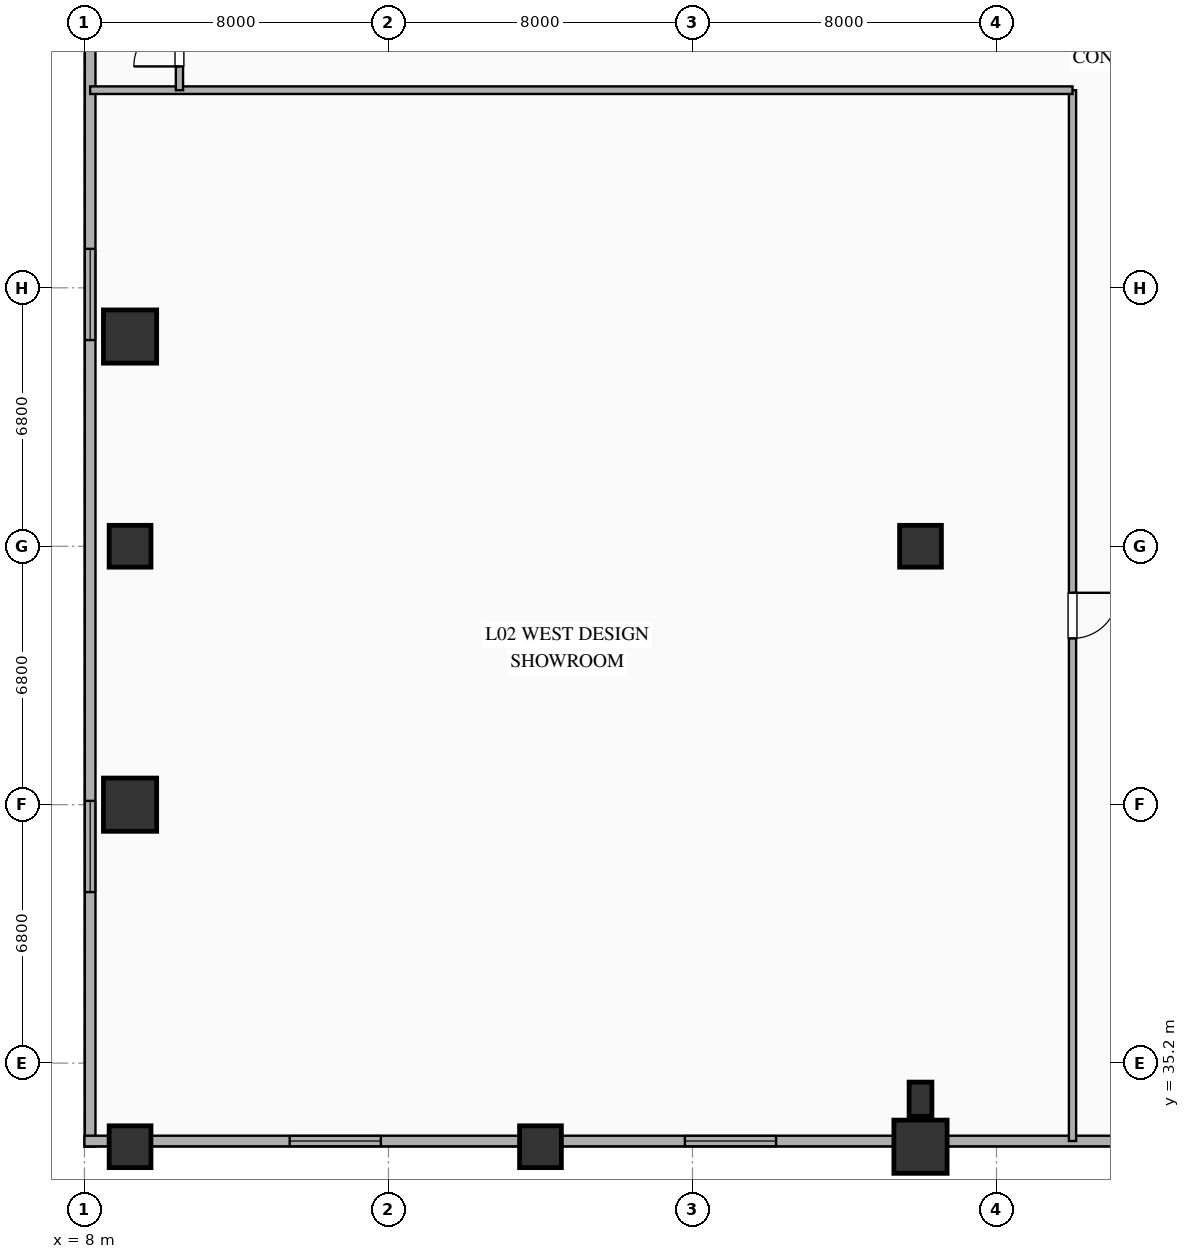
"""IFC4 building model, lengths in metres.
Left out: names, types, materials, properties, quantities, classifications, styles, units other than length and angle.
Written with IfcOpenShell. Run it as: python <this file> out.ifc"""

import sys

from ifc_helpers import new_model, si_unit, direction, frame, frame_2d, origin, origin_2d, place, context, subcontext, project, spatial, rectangle, extrude, element, fill, save


model = new_model("IFC4")
c1 = context("Model", 3, precision=1e-05, world=origin(), true_north=direction((0.0, 1.0)))
c2 = subcontext(c1, "Body", "Model", "MODEL_VIEW")
j1 = project(units=[si_unit("LENGTHUNIT", "METRE"), si_unit("PLANEANGLEUNIT", "RADIAN")], contexts=[c1])
p1 = place(None, origin())
s1 = spatial("IfcSite", under=j1, at=p1, CompositionType="ELEMENT")
p2 = place(p1, origin())
s2 = spatial("IfcBuilding", under=s1, at=p2, CompositionType="ELEMENT")
p3 = place(p2, frame((0.0, 0.0, 11.4)))
s3 = spatial("IfcBuildingStorey", under=s2, at=p3, CompositionType="ELEMENT", Elevation=11.4)
for number, where, z_axis, x_axis in (
    (1, (9.2, 33.0, 0.0), (0.0, 0.0, 1.0), (1.0, 0.0, 0.0)),
    (2, (9.2, 48.8, 0.0), (0.0, 0.0, 1.0), (1.0, 0.0, 0.0)),
    (3, (20.0, 33.0, 0.0), (0.0, 0.0, 1.0), (1.0, 0.0, 0.0)),
):
    element("IfcColumn", number, at=place(p3, frame(where, z_axis=z_axis, x_axis=x_axis)), inside=s3, PredefinedType="COLUMN", context=c2, shape_type="SweptSolid", body=[
        extrude(rectangle(XDim=1.1, YDim=1.1, at=origin_2d()), origin(), (0.0, 0.0, 1.0), 5.1),
    ])
p4 = place(p3, frame((30.0, 33.0, 0.0), z_axis=(0.0, 0.0, 1.0), x_axis=(1.0, 0.0, 0.0)))
e4 = element("IfcColumn", 4, at=p4, inside=s3, PredefinedType="COLUMN", context=c2, shape_type="SweptSolid", body=[
    extrude(rectangle(XDim=1.4, YDim=1.4, at=origin_2d()), origin(), (0.0, 0.0, 1.0), 5.1),
])
p5 = place(p3, frame((30.0, 48.8, 0.0), z_axis=(0.0, 0.0, 1.0), x_axis=(1.0, 0.0, 0.0)))
e5 = element("IfcColumn", 5, at=p5, inside=s3, PredefinedType="COLUMN", context=c2, shape_type="SweptSolid", body=[
    extrude(rectangle(XDim=1.1, YDim=1.1, at=origin_2d()), origin(), (0.0, 0.0, 1.0), 5.1),
])
for number, where, z_axis, x_axis in (
    (6, (9.2, 54.318, 0.0), (0.0, 0.0, 1.0), (1.0, 0.0, 0.0)),
    (7, (9.2, 42.0, 0.0), (0.0, 0.0, 1.0), (1.0, 0.0, 0.0)),
):
    element("IfcColumn", number, at=place(p3, frame(where, z_axis=z_axis, x_axis=x_axis)), inside=s3, PredefinedType="COLUMN", context=c2, shape_type="SweptSolid", body=[
        extrude(rectangle(XDim=1.4, YDim=1.4, at=origin_2d()), origin(), (0.0, 0.0, 1.0), 5.1),
    ])
p6 = place(p3, frame((30.0, 34.25, 0.0), z_axis=(0.0, 0.0, 1.0), x_axis=(1.0, 0.0, 0.0)))
e8 = element("IfcColumn", 8, at=p6, inside=s3, PredefinedType="PILASTER", context=c2, shape_type="SweptSolid", body=[
    extrude(rectangle(XDim=0.6, YDim=0.9, at=origin_2d()), origin(), (0.0, 0.0, 1.0), 5.1),
])
p7 = place(p3, frame((8.15, 33.0, 0.0), z_axis=(0.0, 0.0, 1.0), x_axis=(0.0, 1.0, 0.0)))
e9 = element("IfcWall", 9, at=p7, inside=s3, PredefinedType="SOLIDWALL", context=c2, shape_type="SweptSolid", body=[
    extrude(rectangle(XDim=41.35, YDim=0.28, at=frame_2d((20.675, 0.0))), origin(), (0.0, 0.0, 1.0), 5.1),
])
p8 = place(p7, frame((6.7, 0.0, 0.9)))
e10 = element("IfcOpeningElement", 10, at=p8, cuts=e9, PredefinedType="OPENING", context=c2, shape_type="SweptSolid", body=[
    extrude(rectangle(XDim=2.4, YDim=2.6, at=frame_2d((1.2, 1.3))), frame((0.0, 0.15, 0.0), z_axis=(0.0, -1.0, 0.0), x_axis=(1.0, 0.0, 0.0)), (0.0, 0.0, 1.0), 0.3),
])
p9 = place(p7, frame((21.225, 0.0, 0.9)))
e11 = element("IfcOpeningElement", 11, at=p9, cuts=e9, PredefinedType="OPENING", context=c2, shape_type="SweptSolid", body=[
    extrude(rectangle(XDim=2.4, YDim=2.6, at=frame_2d((1.2, 1.3))), frame((0.0, 0.15, 0.0), z_axis=(0.0, -1.0, 0.0), x_axis=(1.0, 0.0, 0.0)), (0.0, 0.0, 1.0), 0.3),
])
p10 = place(p7, frame((34.9, 0.0, 0.9)))
e12 = element("IfcOpeningElement", 12, at=p10, cuts=e9, PredefinedType="OPENING", context=c2, shape_type="SweptSolid", body=[
    extrude(rectangle(XDim=2.4, YDim=2.6, at=frame_2d((1.2, 1.3))), frame((0.0, 0.15, 0.0), z_axis=(0.0, -1.0, 0.0), x_axis=(1.0, 0.0, 0.0)), (0.0, 0.0, 1.0), 0.3),
])
p11 = place(p3, frame((88.0, 33.15, 0.0), z_axis=(0.0, 0.0, 1.0), x_axis=(-1.0, 0.0, 0.0)))
e13 = element("IfcWall", 13, at=p11, inside=s3, PredefinedType="SOLIDWALL", context=c2, shape_type="SweptSolid", body=[
    extrude(rectangle(XDim=80.0, YDim=0.28, at=frame_2d((40.0, 0.0))), origin(), (0.0, 0.0, 1.0), 4.35),
])
p12 = place(p11, frame((5.4, 0.0, 0.9)))
e14 = element("IfcOpeningElement", 14, at=p12, cuts=e13, PredefinedType="OPENING", context=c2, shape_type="SweptSolid", body=[
    extrude(rectangle(XDim=2.4, YDim=2.6, at=frame_2d((1.2, 1.3))), frame((0.0, 0.15, 0.0), z_axis=(0.0, -1.0, 0.0), x_axis=(1.0, 0.0, 0.0)), (0.0, 0.0, 1.0), 0.3),
])
p13 = place(p11, frame((15.8, 0.0, 0.9)))
e15 = element("IfcOpeningElement", 15, at=p13, cuts=e13, PredefinedType="OPENING", context=c2, shape_type="SweptSolid", body=[
    extrude(rectangle(XDim=2.4, YDim=2.6, at=frame_2d((1.2, 1.3))), frame((0.0, 0.15, 0.0), z_axis=(0.0, -1.0, 0.0), x_axis=(1.0, 0.0, 0.0)), (0.0, 0.0, 1.0), 0.3),
])
p14 = place(p11, frame((38.8, 0.0, 0.9)))
e16 = element("IfcOpeningElement", 16, at=p14, cuts=e13, PredefinedType="OPENING", context=c2, shape_type="SweptSolid", body=[
    extrude(rectangle(XDim=2.4, YDim=2.6, at=frame_2d((1.2, 1.3))), frame((0.0, 0.15, 0.0), z_axis=(0.0, -1.0, 0.0), x_axis=(1.0, 0.0, 0.0)), (0.0, 0.0, 1.0), 0.3),
])
p15 = place(p11, frame((61.8, 0.0, 0.9)))
e17 = element("IfcOpeningElement", 17, at=p15, cuts=e13, PredefinedType="OPENING", context=c2, shape_type="SweptSolid", body=[
    extrude(rectangle(XDim=2.4, YDim=2.6, at=frame_2d((1.2, 1.3))), frame((0.0, 0.15, 0.0), z_axis=(0.0, -1.0, 0.0), x_axis=(1.0, 0.0, 0.0)), (0.0, 0.0, 1.0), 0.3),
])
p16 = place(p11, frame((72.2, 0.0, 0.9)))
e18 = element("IfcOpeningElement", 18, at=p16, cuts=e13, PredefinedType="OPENING", context=c2, shape_type="SweptSolid", body=[
    extrude(rectangle(XDim=2.4, YDim=2.6, at=frame_2d((1.2, 1.3))), frame((0.0, 0.15, 0.0), z_axis=(0.0, -1.0, 0.0), x_axis=(1.0, 0.0, 0.0)), (0.0, 0.0, 1.0), 0.3),
])
p17 = place(p3, frame((34.0, 60.8, 0.0), z_axis=(0.0, 0.0, 1.0), x_axis=(0.0, -1.0, 0.0)))
e19 = element("IfcWall", 19, at=p17, inside=s3, PredefinedType="PARTITIONING", context=c2, shape_type="SweptSolid", body=[
    extrude(rectangle(XDim=27.65, YDim=0.19, at=frame_2d((13.825, 0.0))), origin(), (0.0, 0.0, 1.0), 4.3),
])
p18 = place(p17, frame((13.225, 0.0, 0.0)))
e20 = element("IfcOpeningElement", 20, at=p18, cuts=e19, PredefinedType="OPENING", context=c2, shape_type="SweptSolid", body=[
    extrude(rectangle(XDim=1.2, YDim=2.25, at=frame_2d((0.6, 1.125))), frame((0.0, 0.105, 0.0), z_axis=(0.0, -1.0, 0.0), x_axis=(1.0, 0.0, 0.0)), (0.0, 0.0, 1.0), 0.21),
])
p19 = place(p3, frame((8.15, 60.8, 0.0), z_axis=(0.0, 0.0, 1.0), x_axis=(1.0, 0.0, 0.0)))
e21 = element("IfcWall", 21, at=p19, inside=s3, PredefinedType="PARTITIONING", context=c2, shape_type="SweptSolid", body=[
    extrude(rectangle(XDim=25.85, YDim=0.2, at=frame_2d((12.925, 0.0))), origin(), (0.0, 0.0, 1.0), 4.3),
])
p20 = place(p3, frame((10.5, 60.8, 0.0), z_axis=(0.0, 0.0, 1.0), x_axis=(0.0, 1.0, 0.0)))
e22 = element("IfcWall", 22, at=p20, inside=s3, PredefinedType="PARTITIONING", context=c2, shape_type="SweptSolid", body=[
    extrude(rectangle(XDim=3.05, YDim=0.19, at=frame_2d((1.525, 0.0))), origin(), (0.0, 0.0, 1.0), 4.3),
])
p21 = place(p20, frame((0.625, 0.0, 0.0)))
e23 = element("IfcOpeningElement", 23, at=p21, cuts=e22, PredefinedType="OPENING", context=c2, shape_type="SweptSolid", body=[
    extrude(rectangle(XDim=1.2, YDim=2.25, at=frame_2d((0.6, 1.125))), frame((0.0, 0.105, 0.0), z_axis=(0.0, -1.0, 0.0), x_axis=(1.0, 0.0, 0.0)), (0.0, 0.0, 1.0), 0.21),
])
p22 = place(p8, origin())
e24 = element("IfcWindow", 24, at=p22, inside=s3, PartitioningType="SINGLE_PANEL", PredefinedType="WINDOW", context=c2, shape_type="SweptSolid", body=[
    extrude(rectangle(XDim=2.4, YDim=2.6, at=frame_2d((1.2, 1.3))), frame((0.0, 0.03, 0.0), z_axis=(0.0, -1.0, 0.0), x_axis=(1.0, 0.0, 0.0)), (0.0, 0.0, 1.0), 0.06),
])
fill(e10, e24)
p23 = place(p9, origin())
e25 = element("IfcWindow", 25, at=p23, inside=s3, PartitioningType="SINGLE_PANEL", PredefinedType="WINDOW", context=c2, shape_type="SweptSolid", body=[
    extrude(rectangle(XDim=2.4, YDim=2.6, at=frame_2d((1.2, 1.3))), frame((0.0, 0.03, 0.0), z_axis=(0.0, -1.0, 0.0), x_axis=(1.0, 0.0, 0.0)), (0.0, 0.0, 1.0), 0.06),
])
fill(e11, e25)
p24 = place(p15, origin())
e26 = element("IfcWindow", 26, at=p24, inside=s3, PartitioningType="SINGLE_PANEL", PredefinedType="WINDOW", context=c2, shape_type="SweptSolid", body=[
    extrude(rectangle(XDim=2.4, YDim=2.6, at=frame_2d((1.2, 1.3))), frame((0.0, 0.03, 0.0), z_axis=(0.0, -1.0, 0.0), x_axis=(1.0, 0.0, 0.0)), (0.0, 0.0, 1.0), 0.06),
])
fill(e17, e26)
p25 = place(p16, origin())
e27 = element("IfcWindow", 27, at=p25, inside=s3, PartitioningType="SINGLE_PANEL", PredefinedType="WINDOW", context=c2, shape_type="SweptSolid", body=[
    extrude(rectangle(XDim=2.4, YDim=2.6, at=frame_2d((1.2, 1.3))), frame((0.0, 0.03, 0.0), z_axis=(0.0, -1.0, 0.0), x_axis=(1.0, 0.0, 0.0)), (0.0, 0.0, 1.0), 0.06),
])
fill(e18, e27)
p26 = place(p18, origin())
e28 = element("IfcDoor", 28, at=p26, inside=s3, OperationType="SINGLE_SWING_LEFT", PredefinedType="DOOR", context=c2, shape_type="SweptSolid", body=[
    extrude(rectangle(XDim=1.2, YDim=2.25, at=frame_2d((0.6, 1.125))), frame((0.0, 0.025, 0.0), z_axis=(0.0, -1.0, 0.0), x_axis=(1.0, 0.0, 0.0)), (0.0, 0.0, 1.0), 0.05),
])
fill(e20, e28)
p27 = place(p21, origin())
e29 = element("IfcDoor", 29, at=p27, inside=s3, OperationType="SINGLE_SWING_LEFT", PredefinedType="DOOR", context=c2, shape_type="SweptSolid", body=[
    extrude(rectangle(XDim=1.2, YDim=2.25, at=frame_2d((0.6, 1.125))), frame((0.0, 0.025, 0.0), z_axis=(0.0, -1.0, 0.0), x_axis=(1.0, 0.0, 0.0)), (0.0, 0.0, 1.0), 0.05),
])
fill(e23, e29)
save(model, sys.argv[1])
